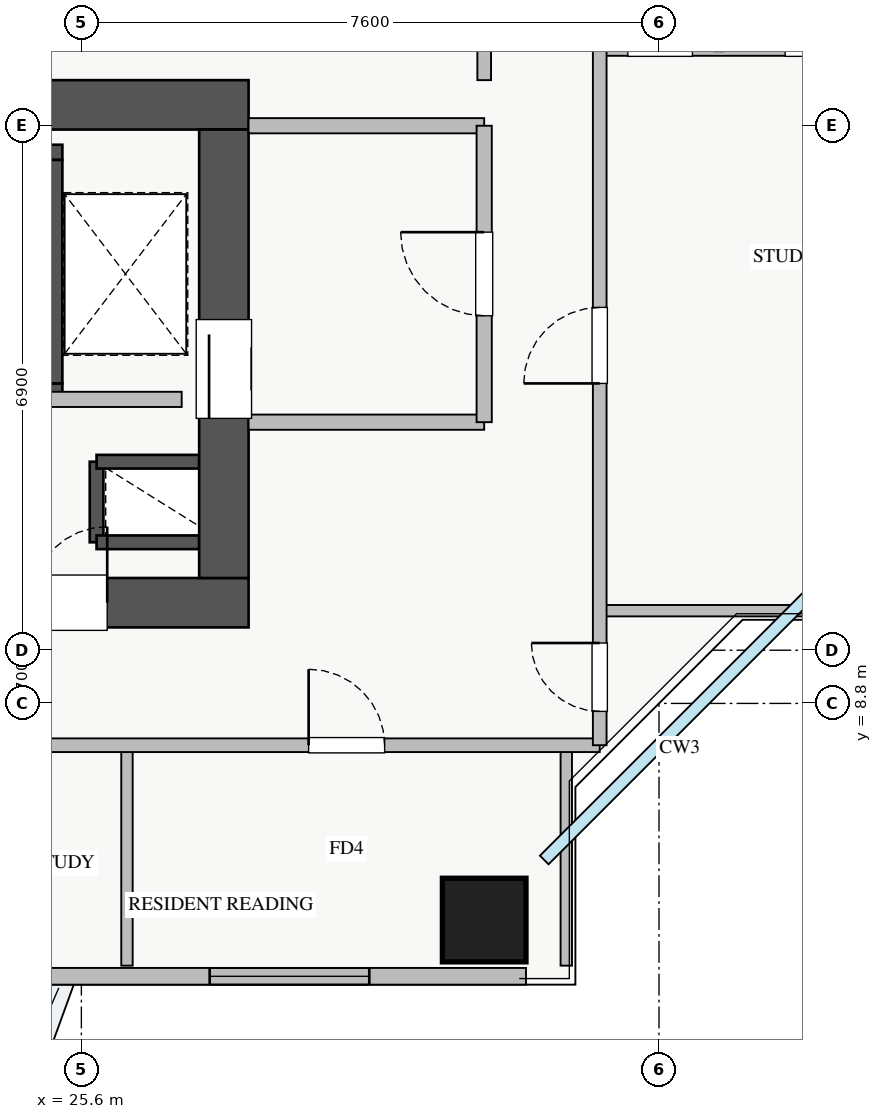
"""IFC4 building model, lengths in metres.
Left out: names, types, materials, properties, quantities, classifications, styles, units other than length and angle.
Written with IfcOpenShell. Run it as: python <this file> out.ifc"""

import sys

from ifc_helpers import new_model, si_unit, direction, frame, frame_2d, origin, origin_2d, place, context, subcontext, project, spatial, rectangle, extrude, source, transform, mapped, element, fill, save


model = new_model("IFC4")
c1 = context("Model", 3, precision=1e-05, world=origin(), true_north=direction((0.0, 1.0)))
c2 = subcontext(c1, "Body", "Model", "MODEL_VIEW")
j1 = project(units=[si_unit("LENGTHUNIT", "METRE"), si_unit("PLANEANGLEUNIT", "RADIAN")], contexts=[c1])
p1 = place(None, origin())
s1 = spatial("IfcSite", under=j1, at=p1, CompositionType="ELEMENT")
p2 = place(p1, origin())
s2 = spatial("IfcBuilding", under=s1, at=p2, CompositionType="ELEMENT")
p3 = place(p2, frame((0.0, 0.0, 116.5)))
s3 = spatial("IfcBuildingStorey", under=s2, at=p3, CompositionType="ELEMENT", Elevation=116.5)
p4 = place(p3, frame((25.8, 10.92, 0.0), z_axis=(0.0, 0.0, 1.0), x_axis=(0.0, 1.0, 0.0)))
e1 = element("IfcWall", 1, at=p4, inside=s3, PredefinedType="SHEAR", context=c2, shape_type="SweptSolid", body=[
    extrude(rectangle(XDim=1.06, YDim=0.18, at=frame_2d((0.53, 0.0))), origin(), (0.0, 0.0, 1.0), 3.07),
])
for number, where, z_axis, x_axis in (
    (2, (25.8, 11.98, 0.0), (0.0, 0.0, 1.0), (1.0, 0.0, 0.0)),
    (3, (25.8, 10.92, 0.0), (0.0, 0.0, 1.0), (1.0, 0.0, 0.0)),
):
    element("IfcWall", number, at=place(p3, frame(where, z_axis=z_axis, x_axis=x_axis)), inside=s3, PredefinedType="SHEAR", context=c2, shape_type="SweptSolid", body=[
        extrude(rectangle(XDim=1.35, YDim=0.18, at=frame_2d((0.675, 0.0))), origin(), (0.0, 0.0, 1.0), 3.07),
    ])
p5 = place(p3, frame((18.2, 12.91, 0.0), z_axis=(0.0, 0.0, 1.0), x_axis=(1.0, 0.0, 0.0)))
e4 = element("IfcWall", 4, at=p5, inside=s3, PredefinedType="SHEAR", context=c2, shape_type="SweptSolid", body=[
    extrude(rectangle(XDim=7.15, YDim=0.2, at=frame_2d((3.575, 0.0))), origin(), (0.0, 0.0, 1.0), 3.25),
])
p6 = place(p5, frame((0.35, 0.0, 0.0)))
e5 = element("IfcOpeningElement", 5, at=p6, cuts=e4, PredefinedType="OPENING", context=c2, shape_type="SweptSolid", body=[
    extrude(rectangle(XDim=1.1, YDim=2.05, at=frame_2d((0.55, 1.025))), frame((0.0, 0.11, 0.0), z_axis=(0.0, -1.0, 0.0), x_axis=(1.0, 0.0, 0.0)), (0.0, 0.0, 1.0), 0.22),
])
p7 = place(p3, frame((18.2, 16.05, 0.0), z_axis=(0.0, 0.0, 1.0), x_axis=(1.0, 0.0, 0.0)))
e6 = element("IfcWall", 6, at=p7, inside=s3, PredefinedType="SHEAR", context=c2, shape_type="SweptSolid", body=[
    extrude(rectangle(XDim=7.15, YDim=0.2, at=frame_2d((3.575, 0.0))), origin(), (0.0, 0.0, 1.0), 3.25),
])
p8 = place(p3, frame((25.25, 13.01, 0.0), z_axis=(0.0, 0.0, 1.0), x_axis=(0.0, 1.0, 0.0)))
e7 = element("IfcWall", 7, at=p8, inside=s3, PredefinedType="SHEAR", context=c2, shape_type="SweptSolid", body=[
    extrude(rectangle(XDim=2.94, YDim=0.2, at=frame_2d((1.47, 0.0))), origin(), (0.0, 0.0, 1.0), 3.25),
])
p9 = place(p3, frame((10.2, 10.125, 0.0), z_axis=(0.0, 0.0, 1.0), x_axis=(1.0, 0.0, 0.0)))
e8 = element("IfcWall", 8, at=p9, inside=s3, PredefinedType="SHEAR", context=c2, shape_type="SweptSolid", body=[
    extrude(rectangle(XDim=17.6, YDim=0.65, at=frame_2d((8.8, 0.0))), origin(), (0.0, 0.0, 1.0), 3.25),
])
p10 = place(p9, frame((1.15, 0.0, 0.0)))
e9 = element("IfcOpeningElement", 9, at=p10, cuts=e8, PredefinedType="OPENING", context=c2, shape_type="SweptSolid", body=[
    extrude(rectangle(XDim=1.1, YDim=2.05, at=frame_2d((0.55, 1.025))), frame((0.0, 0.335, 0.0), z_axis=(0.0, -1.0, 0.0), x_axis=(1.0, 0.0, 0.0)), (0.0, 0.0, 1.0), 0.67),
])
p11 = place(p9, frame((8.3, 0.0, 0.0)))
e10 = element("IfcOpeningElement", 10, at=p11, cuts=e8, PredefinedType="OPENING", context=c2, shape_type="SweptSolid", body=[
    extrude(rectangle(XDim=1.1, YDim=2.05, at=frame_2d((0.55, 1.025))), frame((0.0, 0.335, 0.0), z_axis=(0.0, -1.0, 0.0), x_axis=(1.0, 0.0, 0.0)), (0.0, 0.0, 1.0), 0.67),
])
p12 = place(p9, frame((4.9, 0.0, 0.0)))
e11 = element("IfcOpeningElement", 11, at=p12, cuts=e8, PredefinedType="OPENING", context=c2, shape_type="SweptSolid", body=[
    extrude(rectangle(XDim=1.1, YDim=2.05, at=frame_2d((0.55, 1.025))), frame((0.0, 0.335, 0.0), z_axis=(0.0, -1.0, 0.0), x_axis=(1.0, 0.0, 0.0)), (0.0, 0.0, 1.0), 0.67),
])
p13 = place(p9, frame((14.74, 0.0, 0.0)))
e12 = element("IfcOpeningElement", 12, at=p13, cuts=e8, PredefinedType="OPENING", context=c2, shape_type="SweptSolid", body=[
    extrude(rectangle(XDim=1.0, YDim=2.05, at=frame_2d((0.5, 1.025))), frame((0.0, 0.335, 0.0), z_axis=(0.0, -1.0, 0.0), x_axis=(1.0, 0.0, 0.0)), (0.0, 0.0, 1.0), 0.67),
])
p14 = place(p9, frame((11.67, 0.0, 0.0)))
e13 = element("IfcOpeningElement", 13, at=p14, cuts=e8, PredefinedType="OPENING", context=c2, shape_type="SweptSolid", body=[
    extrude(rectangle(XDim=1.0, YDim=2.05, at=frame_2d((0.5, 1.025))), frame((0.0, 0.335, 0.0), z_axis=(0.0, -1.0, 0.0), x_axis=(1.0, 0.0, 0.0)), (0.0, 0.0, 1.0), 0.67),
])
p15 = place(p3, frame((10.2, 16.675, 0.0), z_axis=(0.0, 0.0, 1.0), x_axis=(1.0, 0.0, 0.0)))
e14 = element("IfcWall", 14, at=p15, inside=s3, PredefinedType="SHEAR", context=c2, shape_type="SweptSolid", body=[
    extrude(rectangle(XDim=17.6, YDim=0.65, at=frame_2d((8.8, 0.0))), origin(), (0.0, 0.0, 1.0), 3.25),
])
p16 = place(p3, frame((27.475, 10.45, 0.0), z_axis=(0.0, 0.0, 1.0), x_axis=(0.0, 1.0, 0.0)))
e15 = element("IfcWall", 15, at=p16, inside=s3, PredefinedType="SHEAR", context=c2, shape_type="SweptSolid", body=[
    extrude(rectangle(XDim=5.9, YDim=0.65, at=frame_2d((2.95, 0.0))), origin(), (0.0, 0.0, 1.0), 3.25),
])
p17 = place(p16, frame((2.1, 0.0, 0.0)))
e16 = element("IfcOpeningElement", 16, at=p17, cuts=e15, PredefinedType="OPENING", context=c2, shape_type="SweptSolid", body=[
    extrude(rectangle(XDim=1.3, YDim=2.05, at=frame_2d((0.65, 1.025))), frame((0.0, 0.335, 0.0), z_axis=(0.0, -1.0, 0.0), x_axis=(1.0, 0.0, 0.0)), (0.0, 0.0, 1.0), 0.67),
])
m1 = source(origin(), c2, "Body", "SweptSolid", [
    extrude(rectangle(XDim=1.1, YDim=1.1, at=origin_2d()), origin(), (0.0, 0.0, 1.0), 3.25),
])
p18 = place(p3, frame((30.9, 5.95, 0.0), z_axis=(0.0, 0.0, 1.0), x_axis=(1.0, 0.0, 0.0)))
e17 = element("IfcColumn", 17, at=p18, inside=s3, PredefinedType="COLUMN", context=c2, shape_type="MappedRepresentation", body=[
    mapped(m1, transform((0.0, 0.0, 0.0), x_axis=(1.0, 0.0, 0.0), y_axis=(0.0, 1.0, 0.0), z_axis=(0.0, 0.0, 1.0), scale=1.0)),
])
p19 = place(p3, frame((6.55, 5.21, 0.0), z_axis=(0.0, 0.0, 1.0), x_axis=(1.0, 0.0, 0.0)))
e18 = element("IfcWall", 18, at=p19, inside=s3, PredefinedType="STANDARD", context=c2, shape_type="SweptSolid", body=[
    extrude(rectangle(XDim=24.9, YDim=0.22, at=frame_2d((12.45, 0.0))), origin(), (0.0, 0.0, 1.0), 2.61),
])
p20 = place(p19, frame((13.3, 0.0, 0.0)))
e19 = element("IfcOpeningElement", 19, at=p20, cuts=e18, PredefinedType="OPENING", context=c2, shape_type="SweptSolid", body=[
    extrude(rectangle(XDim=1.2, YDim=2.1, at=frame_2d((0.6, 1.05))), frame((0.0, 0.12, 0.0), z_axis=(0.0, -1.0, 0.0), x_axis=(1.0, 0.0, 0.0)), (0.0, 0.0, 1.0), 0.24),
])
p21 = place(p19, frame((0.258, 0.0, 0.9)))
e20 = element("IfcOpeningElement", 20, at=p21, cuts=e18, PredefinedType="OPENING", context=c2, shape_type="SweptSolid", body=[
    extrude(rectangle(XDim=1.8, YDim=1.5, at=frame_2d((0.9, 0.75))), frame((0.0, 0.12, 0.0), z_axis=(0.0, -1.0, 0.0), x_axis=(1.0, 0.0, 0.0)), (0.0, 0.0, 1.0), 0.24),
])
p22 = place(p19, frame((9.775, 0.0, 0.9)))
e21 = element("IfcOpeningElement", 21, at=p22, cuts=e18, PredefinedType="OPENING", context=c2, shape_type="SweptSolid", body=[
    extrude(rectangle(XDim=1.8, YDim=1.5, at=frame_2d((0.9, 0.75))), frame((0.0, 0.12, 0.0), z_axis=(0.0, -1.0, 0.0), x_axis=(1.0, 0.0, 0.0)), (0.0, 0.0, 1.0), 0.24),
])
p23 = place(p19, frame((14.813, 0.0, 0.9)))
e22 = element("IfcOpeningElement", 22, at=p23, cuts=e18, PredefinedType="OPENING", context=c2, shape_type="SweptSolid", body=[
    extrude(rectangle(XDim=1.5, YDim=1.45, at=frame_2d((0.75, 0.725))), frame((0.0, 0.12, 0.0), z_axis=(0.0, -1.0, 0.0), x_axis=(1.0, 0.0, 0.0)), (0.0, 0.0, 1.0), 0.24),
])
p24 = place(p19, frame((20.738, 0.0, 0.9)))
e23 = element("IfcOpeningElement", 23, at=p24, cuts=e18, PredefinedType="OPENING", context=c2, shape_type="SweptSolid", body=[
    extrude(rectangle(XDim=2.1, YDim=1.48, at=frame_2d((1.05, 0.74))), frame((0.0, 0.12, 0.0), z_axis=(0.0, -1.0, 0.0), x_axis=(1.0, 0.0, 0.0)), (0.0, 0.0, 1.0), 0.24),
])
p25 = place(p19, frame((4.187, 0.0, 0.9)))
e24 = element("IfcOpeningElement", 24, at=p25, cuts=e18, PredefinedType="OPENING", context=c2, shape_type="SweptSolid", body=[
    extrude(rectangle(XDim=2.4, YDim=1.5, at=frame_2d((1.2, 0.75))), frame((0.0, 0.12, 0.0), z_axis=(0.0, -1.0, 0.0), x_axis=(1.0, 0.0, 0.0)), (0.0, 0.0, 1.0), 0.24),
])
for number, where, z_axis, x_axis in (
    (25, (27.8, 16.4, 0.0), (0.0, 0.0, 1.0), (1.0, 0.0, 0.0)),
    (26, (27.8, 12.5, 0.0), (0.0, 0.0, 1.0), (1.0, 0.0, 0.0)),
):
    element("IfcWall", number, at=place(p3, frame(where, z_axis=z_axis, x_axis=x_axis)), inside=s3, PredefinedType="PARTITIONING", context=c2, shape_type="SweptSolid", body=[
        extrude(rectangle(XDim=3.1, YDim=0.2, at=frame_2d((1.55, 0.0))), origin(), (0.0, 0.0, 1.0), 3.07),
    ])
p26 = place(p3, frame((30.9, 12.5, 0.0), z_axis=(0.0, 0.0, 1.0), x_axis=(0.0, 1.0, 0.0)))
e27 = element("IfcWall", 27, at=p26, inside=s3, PredefinedType="PARTITIONING", context=c2, shape_type="SweptSolid", body=[
    extrude(rectangle(XDim=3.9, YDim=0.2, at=frame_2d((1.95, 0.0))), origin(), (0.0, 0.0, 1.0), 3.07),
])
p27 = place(p26, frame((1.4, 0.0, 0.0)))
e28 = element("IfcOpeningElement", 28, at=p27, cuts=e27, PredefinedType="OPENING", context=c2, shape_type="SweptSolid", body=[
    extrude(rectangle(XDim=1.1, YDim=2.05, at=frame_2d((0.55, 1.025))), frame((0.0, 0.11, 0.0), z_axis=(0.0, -1.0, 0.0), x_axis=(1.0, 0.0, 0.0)), (0.0, 0.0, 1.0), 0.22),
])
p28 = place(p3, frame((21.75, 12.8, 0.0), z_axis=(0.0, 0.0, 1.0), x_axis=(1.0, 0.0, 0.0)))
e29 = element("IfcWall", 29, at=p28, inside=s3, PredefinedType="PARTITIONING", context=c2, shape_type="SweptSolid", body=[
    extrude(rectangle(XDim=5.17, YDim=0.2, at=frame_2d((2.585, 0.0))), origin(), (0.0, 0.0, 1.0), 3.07),
])
for number, where, z_axis, x_axis in (
    (30, (26.2, 5.35, 0.0), (0.0, 0.0, 1.0), (0.0, 1.0, 0.0)),
    (31, (31.98, 5.35, 0.0), (0.0, 0.0, 1.0), (0.0, 1.0, 0.0)),
):
    element("IfcWall", number, at=place(p3, frame(where, z_axis=z_axis, x_axis=x_axis)), inside=s3, PredefinedType="PARTITIONING", context=c2, shape_type="SweptSolid", body=[
        extrude(rectangle(XDim=2.9, YDim=0.15, at=frame_2d((1.45, 0.0))), origin(), (0.0, 0.0, 1.0), 3.07),
    ])
p29 = place(p3, frame((8.85, 8.25, 0.0), z_axis=(0.0, 0.0, 1.0), x_axis=(1.0, 0.0, 0.0)))
e32 = element("IfcWall", 32, at=p29, inside=s3, PredefinedType="PARTITIONING", context=c2, shape_type="SweptSolid", body=[
    extrude(rectangle(XDim=23.57, YDim=0.18, at=frame_2d((11.785, 0.0))), origin(), (0.0, 0.0, 1.0), 3.07),
])
p30 = place(p29, frame((2.75, 0.0, 0.0)))
e33 = element("IfcOpeningElement", 33, at=p30, cuts=e32, PredefinedType="OPENING", context=c2, shape_type="SweptSolid", body=[
    extrude(rectangle(XDim=1.0, YDim=2.05, at=frame_2d((0.5, 1.025))), frame((0.0, 0.1, 0.0), z_axis=(0.0, -1.0, 0.0), x_axis=(1.0, 0.0, 0.0)), (0.0, 0.0, 1.0), 0.2),
])
p31 = place(p29, frame((7.875, 0.0, 0.0)))
e34 = element("IfcOpeningElement", 34, at=p31, cuts=e32, PredefinedType="OPENING", context=c2, shape_type="SweptSolid", body=[
    extrude(rectangle(XDim=1.0, YDim=2.05, at=frame_2d((0.5, 1.025))), frame((0.0, 0.1, 0.0), z_axis=(0.0, -1.0, 0.0), x_axis=(1.0, 0.0, 0.0)), (0.0, 0.0, 1.0), 0.2),
])
p32 = place(p29, frame((13.3, 0.0, 0.0)))
e35 = element("IfcOpeningElement", 35, at=p32, cuts=e32, PredefinedType="OPENING", context=c2, shape_type="SweptSolid", body=[
    extrude(rectangle(XDim=1.0, YDim=2.05, at=frame_2d((0.5, 1.025))), frame((0.0, 0.1, 0.0), z_axis=(0.0, -1.0, 0.0), x_axis=(1.0, 0.0, 0.0)), (0.0, 0.0, 1.0), 0.2),
])
p33 = place(p29, frame((19.74, 0.0, 0.0)))
e36 = element("IfcOpeningElement", 36, at=p33, cuts=e32, PredefinedType="OPENING", context=c2, shape_type="SweptSolid", body=[
    extrude(rectangle(XDim=1.0, YDim=2.05, at=frame_2d((0.5, 1.025))), frame((0.0, 0.1, 0.0), z_axis=(0.0, -1.0, 0.0), x_axis=(1.0, 0.0, 0.0)), (0.0, 0.0, 1.0), 0.2),
])
p34 = place(p3, frame((32.42, 10.02, 0.0), z_axis=(0.0, 0.0, 1.0), x_axis=(1.0, 0.0, 0.0)))
e37 = element("IfcWall", 37, at=p34, inside=s3, PredefinedType="PARTITIONING", context=c2, shape_type="SweptSolid", body=[
    extrude(rectangle(XDim=4.23, YDim=0.15, at=frame_2d((2.115, 0.0))), origin(), (0.0, 0.0, 1.0), 3.07),
])
p35 = place(p3, frame((32.42, 17.38, 0.0), z_axis=(0.0, 0.0, 1.0), x_axis=(1.0, 0.0, 0.0)))
e38 = element("IfcWall", 38, at=p35, inside=s3, PredefinedType="PLUMBINGWALL", context=c2, shape_type="SweptSolid", body=[
    extrude(rectangle(XDim=4.23, YDim=0.12, at=frame_2d((2.115, 0.0))), origin(), (0.0, 0.0, 1.0), 3.07),
])
p36 = place(p35, frame((0.37, 0.0, 0.0)))
e39 = element("IfcOpeningElement", 39, at=p36, cuts=e38, PredefinedType="OPENING", context=c2, shape_type="SweptSolid", body=[
    extrude(rectangle(XDim=0.85, YDim=2.05, at=frame_2d((0.425, 1.025))), frame((0.0, 0.07, 0.0), z_axis=(0.0, -1.0, 0.0), x_axis=(1.0, 0.0, 0.0)), (0.0, 0.0, 1.0), 0.14),
])
p37 = place(p35, frame((2.44, 0.0, 0.0)))
e40 = element("IfcOpeningElement", 40, at=p37, cuts=e38, PredefinedType="OPENING", context=c2, shape_type="SweptSolid", body=[
    extrude(rectangle(XDim=0.9, YDim=2.05, at=frame_2d((0.45, 1.025))), frame((0.0, 0.07, 0.0), z_axis=(0.0, -1.0, 0.0), x_axis=(1.0, 0.0, 0.0)), (0.0, 0.0, 1.0), 0.14),
])
p38 = place(p3, frame((32.42, 8.25, 0.0), z_axis=(0.0, 0.0, 1.0), x_axis=(0.0, 1.0, 0.0)))
e41 = element("IfcWall", 41, at=p38, inside=s3, PredefinedType="PARTITIONING", context=c2, shape_type="SweptSolid", body=[
    extrude(rectangle(XDim=29.5, YDim=0.18, at=frame_2d((14.75, 0.0))), origin(), (0.0, 0.0, 1.0), 3.07),
])
p39 = place(p38, frame((28.155, 0.0, 0.0)))
e42 = element("IfcOpeningElement", 42, at=p39, cuts=e41, PredefinedType="OPENING", context=c2, shape_type="SweptSolid", body=[
    extrude(rectangle(XDim=0.9, YDim=2.05, at=frame_2d((0.45, 1.025))), frame((0.0, 0.1, 0.0), z_axis=(0.0, -1.0, 0.0), x_axis=(1.0, 0.0, 0.0)), (0.0, 0.0, 1.0), 0.2),
])
p40 = place(p38, frame((0.445, 0.0, 0.0)))
e43 = element("IfcOpeningElement", 43, at=p40, cuts=e41, PredefinedType="OPENING", context=c2, shape_type="SweptSolid", body=[
    extrude(rectangle(XDim=0.9, YDim=2.05, at=frame_2d((0.45, 1.025))), frame((0.0, 0.1, 0.0), z_axis=(0.0, -1.0, 0.0), x_axis=(1.0, 0.0, 0.0)), (0.0, 0.0, 1.0), 0.2),
])
p41 = place(p38, frame((4.76, 0.0, 0.0)))
e44 = element("IfcOpeningElement", 44, at=p41, cuts=e41, PredefinedType="OPENING", context=c2, shape_type="SweptSolid", body=[
    extrude(rectangle(XDim=1.0, YDim=2.05, at=frame_2d((0.5, 1.025))), frame((0.0, 0.1, 0.0), z_axis=(0.0, -1.0, 0.0), x_axis=(1.0, 0.0, 0.0)), (0.0, 0.0, 1.0), 0.2),
])
p42 = place(p38, frame((18.04, 0.0, 0.0)))
e45 = element("IfcOpeningElement", 45, at=p42, cuts=e41, PredefinedType="OPENING", context=c2, shape_type="SweptSolid", body=[
    extrude(rectangle(XDim=1.0, YDim=2.05, at=frame_2d((0.5, 1.025))), frame((0.0, 0.1, 0.0), z_axis=(0.0, -1.0, 0.0), x_axis=(1.0, 0.0, 0.0)), (0.0, 0.0, 1.0), 0.2),
])
p43 = place(p3, frame((30.9, 17.0, 0.0), z_axis=(0.0, 0.0, 1.0), x_axis=(0.0, 1.0, 0.0)))
e46 = element("IfcWall", 46, at=p43, inside=s3, PredefinedType="PARTITIONING", context=c2, shape_type="SweptSolid", body=[
    extrude(rectangle(XDim=12.0, YDim=0.18, at=frame_2d((6.0, 0.0))), origin(), (0.0, 0.0, 1.0), 3.07),
])
p44 = place(p43, frame((0.855, 0.0, 0.0)))
e47 = element("IfcOpeningElement", 47, at=p44, cuts=e46, PredefinedType="OPENING", context=c2, shape_type="SweptSolid", body=[
    extrude(rectangle(XDim=1.0, YDim=2.05, at=frame_2d((0.5, 1.025))), frame((0.0, 0.1, 0.0), z_axis=(0.0, -1.0, 0.0), x_axis=(1.0, 0.0, 0.0)), (0.0, 0.0, 1.0), 0.2),
])
p45 = place(p43, frame((6.725, 0.0, 0.0)))
e48 = element("IfcOpeningElement", 48, at=p45, cuts=e46, PredefinedType="OPENING", context=c2, shape_type="SweptSolid", body=[
    extrude(rectangle(XDim=1.0, YDim=2.05, at=frame_2d((0.5, 1.025))), frame((0.0, 0.1, 0.0), z_axis=(0.0, -1.0, 0.0), x_axis=(1.0, 0.0, 0.0)), (0.0, 0.0, 1.0), 0.2),
])
m2 = source(origin(), c2, "Body", "SweptSolid", [
    extrude(rectangle(XDim=2.1, YDim=1.48, at=frame_2d((1.05, 0.74))), frame((0.0, 0.03, 0.0), z_axis=(0.0, -1.0, 0.0), x_axis=(1.0, 0.0, 0.0)), (0.0, 0.0, 1.0), 0.06),
])
p46 = place(p24, origin())
e49 = element("IfcWindow", 49, at=p46, inside=s3, PartitioningType="TRIPLE_PANEL_VERTICAL", PredefinedType="WINDOW", context=c2, shape_type="MappedRepresentation", body=[
    mapped(m2, transform((0.0, 0.0, 0.0), x_axis=(1.0, 0.0, 0.0), y_axis=(0.0, 1.0, 0.0), z_axis=(0.0, 0.0, 1.0), scale=1.0)),
])
fill(e23, e49)
m3 = source(origin(), c2, "Body", "SweptSolid", [
    extrude(rectangle(XDim=1.3, YDim=2.05, at=frame_2d((0.65, 1.025))), frame((0.0, 0.025, 0.0), z_axis=(0.0, -1.0, 0.0), x_axis=(1.0, 0.0, 0.0)), (0.0, 0.0, 1.0), 0.05),
])
p47 = place(p17, origin())
e50 = element("IfcDoor", 50, at=p47, inside=s3, OperationType="SLIDING_TO_RIGHT", PredefinedType="DOOR", context=c2, shape_type="MappedRepresentation", body=[
    mapped(m3, transform((0.0, 0.0, 0.0), x_axis=(1.0, 0.0, 0.0), y_axis=(0.0, 1.0, 0.0), z_axis=(0.0, 0.0, 1.0), scale=1.0)),
])
fill(e16, e50)
m4 = source(origin(), c2, "Body", "SweptSolid", [
    extrude(rectangle(XDim=1.0, YDim=2.05, at=frame_2d((0.5, 1.025))), frame((0.0, 0.025, 0.0), z_axis=(0.0, -1.0, 0.0), x_axis=(1.0, 0.0, 0.0)), (0.0, 0.0, 1.0), 0.05),
])
p48 = place(p13, origin())
e51 = element("IfcDoor", 51, at=p48, inside=s3, OperationType="SINGLE_SWING_RIGHT", PredefinedType="DOOR", context=c2, shape_type="MappedRepresentation", body=[
    mapped(m4, transform((0.0, 0.0, 0.0), x_axis=(1.0, 0.0, 0.0), y_axis=(0.0, 1.0, 0.0), z_axis=(0.0, 0.0, 1.0), scale=1.0)),
])
fill(e12, e51)
m5 = source(origin(), c2, "Body", "SweptSolid", [
    extrude(rectangle(XDim=1.1, YDim=2.05, at=frame_2d((0.55, 1.025))), frame((0.0, 0.025, 0.0), z_axis=(0.0, -1.0, 0.0), x_axis=(1.0, 0.0, 0.0)), (0.0, 0.0, 1.0), 0.05),
])
p49 = place(p27, origin())
e52 = element("IfcDoor", 52, at=p49, inside=s3, OperationType="SINGLE_SWING_RIGHT", PredefinedType="DOOR", context=c2, shape_type="MappedRepresentation", body=[
    mapped(m5, transform((0.0, 0.0, 0.0), x_axis=(1.0, 0.0, 0.0), y_axis=(0.0, 1.0, 0.0), z_axis=(0.0, 0.0, 1.0), scale=1.0)),
])
fill(e28, e52)
p50 = place(p33, origin())
e53 = element("IfcDoor", 53, at=p50, inside=s3, OperationType="SINGLE_SWING_LEFT", PredefinedType="DOOR", context=c2, shape_type="MappedRepresentation", body=[
    mapped(m4, transform((0.0, 0.0, 0.0), x_axis=(1.0, 0.0, 0.0), y_axis=(0.0, 1.0, 0.0), z_axis=(0.0, 0.0, 1.0), scale=1.0)),
])
fill(e36, e53)
m6 = source(origin(), c2, "Body", "SweptSolid", [
    extrude(rectangle(XDim=0.85, YDim=2.05, at=frame_2d((0.425, 1.025))), frame((0.0, 0.025, 0.0), z_axis=(0.0, -1.0, 0.0), x_axis=(1.0, 0.0, 0.0)), (0.0, 0.0, 1.0), 0.05),
])
p51 = place(p36, origin())
e54 = element("IfcDoor", 54, at=p51, inside=s3, OperationType="SINGLE_SWING_LEFT", PredefinedType="DOOR", context=c2, shape_type="MappedRepresentation", body=[
    mapped(m6, transform((0.0, 0.0, 0.0), x_axis=(1.0, 0.0, 0.0), y_axis=(0.0, 1.0, 0.0), z_axis=(0.0, 0.0, 1.0), scale=1.0)),
])
fill(e39, e54)
m7 = source(origin(), c2, "Body", "SweptSolid", [
    extrude(rectangle(XDim=0.9, YDim=2.05, at=frame_2d((0.45, 1.025))), frame((0.0, 0.025, 0.0), z_axis=(0.0, -1.0, 0.0), x_axis=(1.0, 0.0, 0.0)), (0.0, 0.0, 1.0), 0.05),
])
p52 = place(p37, origin())
e55 = element("IfcDoor", 55, at=p52, inside=s3, OperationType="SINGLE_SWING_RIGHT", PredefinedType="DOOR", context=c2, shape_type="MappedRepresentation", body=[
    mapped(m7, transform((0.0, 0.0, 0.0), x_axis=(1.0, 0.0, 0.0), y_axis=(0.0, 1.0, 0.0), z_axis=(0.0, 0.0, 1.0), scale=1.0)),
])
fill(e40, e55)
p53 = place(p40, origin())
e56 = element("IfcDoor", 56, at=p53, inside=s3, OperationType="SINGLE_SWING_RIGHT", PredefinedType="DOOR", context=c2, shape_type="MappedRepresentation", body=[
    mapped(m7, transform((0.0, 0.0, 0.0), x_axis=(1.0, 0.0, 0.0), y_axis=(0.0, 1.0, 0.0), z_axis=(0.0, 0.0, 1.0), scale=1.0)),
])
fill(e43, e56)
p54 = place(p41, origin())
e57 = element("IfcDoor", 57, at=p54, inside=s3, OperationType="SINGLE_SWING_LEFT", PredefinedType="DOOR", context=c2, shape_type="MappedRepresentation", body=[
    mapped(m4, transform((0.0, 0.0, 0.0), x_axis=(1.0, 0.0, 0.0), y_axis=(0.0, 1.0, 0.0), z_axis=(0.0, 0.0, 1.0), scale=1.0)),
])
fill(e44, e57)
save(model, sys.argv[1])
